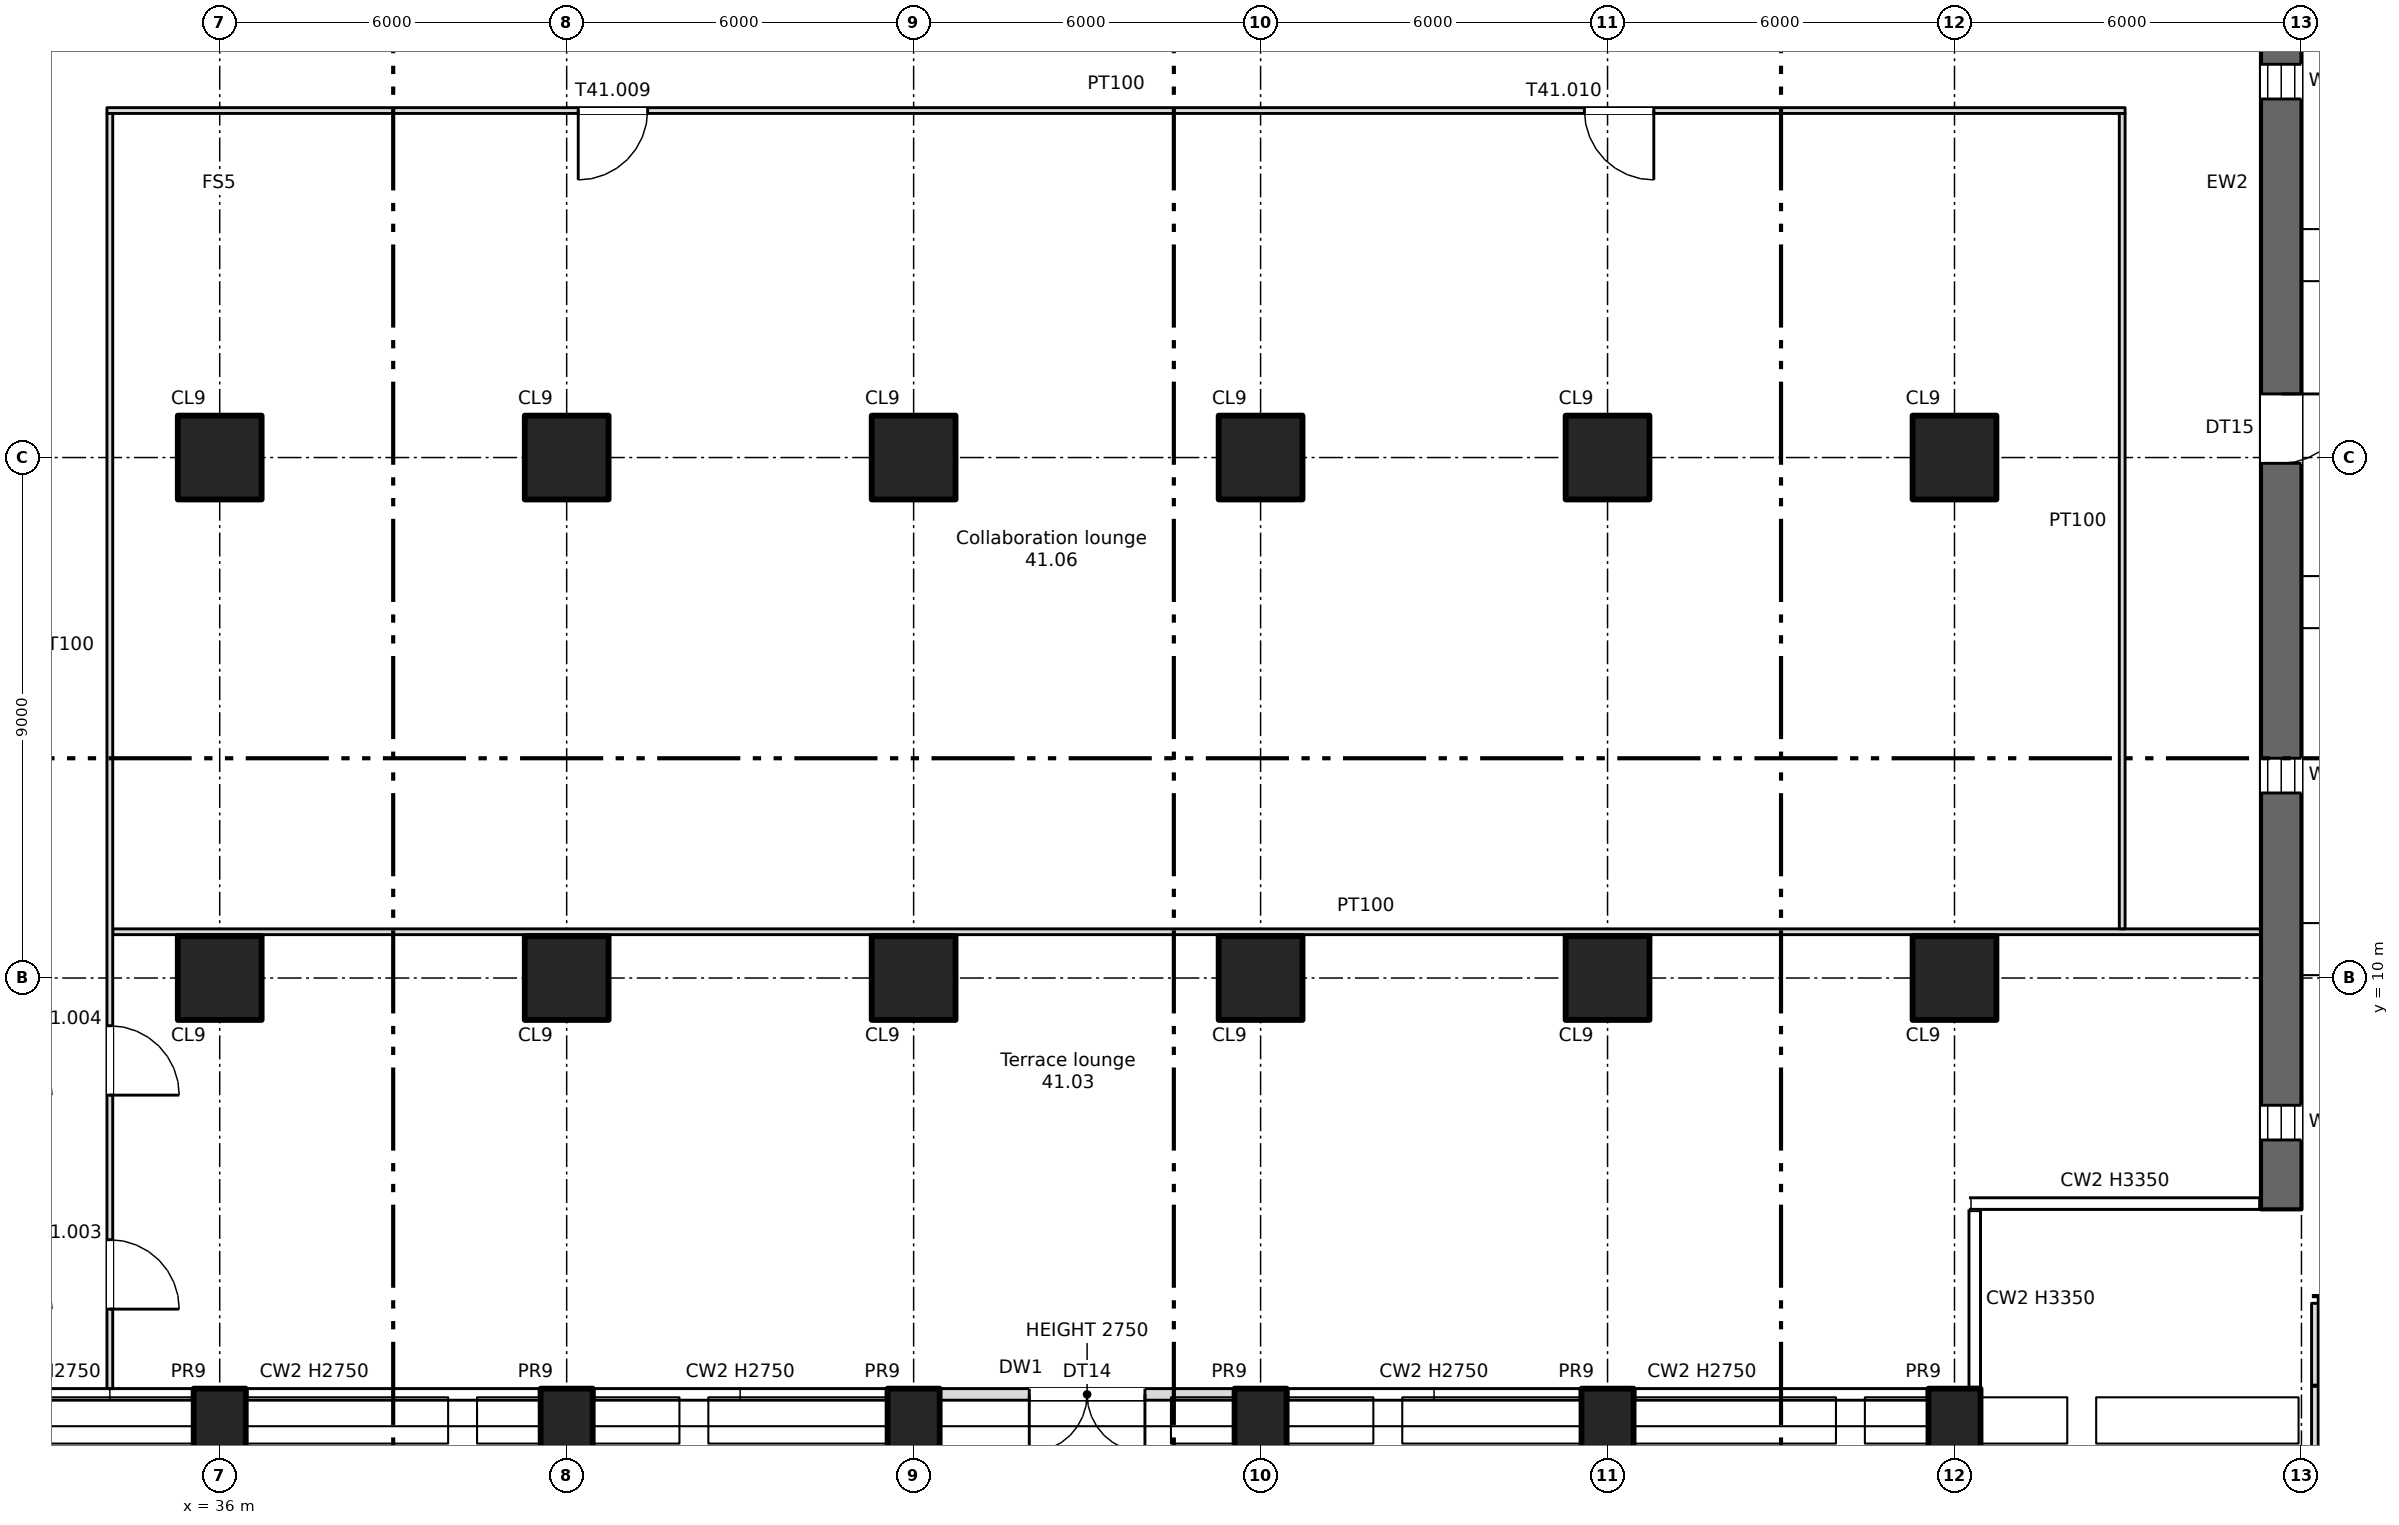
"""IFC4 building model, lengths in metres.
Left out: names, types, materials, properties, quantities, classifications, styles, units other than length and angle.
Written with IfcOpenShell. Run it as: python <this file> out.ifc"""

import sys

from ifc_helpers import new_model, si_unit, direction, frame, frame_2d, origin, origin_2d, place, context, subcontext, project, spatial, rectangle, extrude, element, fill, save


model = new_model("IFC4")
c1 = context("Model", 3, precision=1e-05, world=origin(), true_north=direction((0.0, 1.0)))
c2 = subcontext(c1, "Body", "Model", "MODEL_VIEW")
j1 = project(units=[si_unit("LENGTHUNIT", "METRE"), si_unit("PLANEANGLEUNIT", "RADIAN")], contexts=[c1])
p1 = place(None, origin())
s1 = spatial("IfcSite", under=j1, at=p1, CompositionType="ELEMENT")
p2 = place(p1, origin())
s2 = spatial("IfcBuilding", under=s1, at=p2, CompositionType="ELEMENT")
p3 = place(p2, frame((0.0, 0.0, 95.0)))
s3 = spatial("IfcBuildingStorey", under=s2, at=p3, CompositionType="ELEMENT", Elevation=95.0)
for number, where, z_axis, x_axis in (
    (1, (36.0, 2.2, 0.0), (0.0, 0.0, 1.0), (1.0, 0.0, 0.0)),
    (2, (42.0, 2.2, 0.0), (0.0, 0.0, 1.0), (1.0, 0.0, 0.0)),
    (3, (48.0, 2.2, 0.0), (0.0, 0.0, 1.0), (1.0, 0.0, 0.0)),
    (4, (54.0, 2.2, 0.0), (0.0, 0.0, 1.0), (1.0, 0.0, 0.0)),
    (5, (60.0, 2.2, 0.0), (0.0, 0.0, 1.0), (1.0, 0.0, 0.0)),
    (6, (66.0, 2.2, 0.0), (0.0, 0.0, 1.0), (1.0, 0.0, 0.0)),
):
    element("IfcColumn", number, at=place(p3, frame(where, z_axis=z_axis, x_axis=x_axis)), inside=s3, PredefinedType="COLUMN", context=c2, shape_type="SweptSolid", body=[
        extrude(rectangle(XDim=0.9, YDim=1.4, at=origin_2d()), origin(), (0.0, 0.0, 1.0), 3.35),
    ])
for number, where, z_axis, x_axis in (
    (7, (36.0, 10.0, 0.0), (0.0, 0.0, 1.0), (1.0, 0.0, 0.0)),
    (8, (36.0, 19.0, 0.0), (0.0, 0.0, 1.0), (1.0, 0.0, 0.0)),
    (9, (42.0, 10.0, 0.0), (0.0, 0.0, 1.0), (1.0, 0.0, 0.0)),
    (10, (42.0, 19.0, 0.0), (0.0, 0.0, 1.0), (1.0, 0.0, 0.0)),
    (11, (48.0, 10.0, 0.0), (0.0, 0.0, 1.0), (1.0, 0.0, 0.0)),
    (12, (48.0, 19.0, 0.0), (0.0, 0.0, 1.0), (1.0, 0.0, 0.0)),
    (13, (54.0, 10.0, 0.0), (0.0, 0.0, 1.0), (1.0, 0.0, 0.0)),
    (14, (54.0, 19.0, 0.0), (0.0, 0.0, 1.0), (1.0, 0.0, 0.0)),
    (15, (60.0, 10.0, 0.0), (0.0, 0.0, 1.0), (1.0, 0.0, 0.0)),
    (16, (60.0, 19.0, 0.0), (0.0, 0.0, 1.0), (1.0, 0.0, 0.0)),
    (17, (66.0, 10.0, 0.0), (0.0, 0.0, 1.0), (1.0, 0.0, 0.0)),
    (18, (66.0, 19.0, 0.0), (0.0, 0.0, 1.0), (1.0, 0.0, 0.0)),
):
    element("IfcColumn", number, at=place(p3, frame(where, z_axis=z_axis, x_axis=x_axis)), inside=s3, PredefinedType="COLUMN", context=c2, shape_type="SweptSolid", body=[
        extrude(rectangle(XDim=1.45, YDim=1.45, at=origin_2d()), origin(), (0.0, 0.0, 1.0), 3.35),
    ])
p4 = place(p3, frame((71.65, 6.0, 0.0), z_axis=(0.0, 0.0, 1.0), x_axis=(0.0, 1.0, 0.0)))
e19 = element("IfcWall", 19, at=p4, inside=s3, PredefinedType="SHEAR", context=c2, shape_type="SweptSolid", body=[
    extrude(rectangle(XDim=35.5, YDim=0.7, at=frame_2d((17.75, 0.0))), origin(), (0.0, 0.0, 1.0), 3.35),
])
p5 = place(p4, frame((1.2, 0.0, 0.6)))
e20 = element("IfcOpeningElement", 20, at=p5, cuts=e19, PredefinedType="OPENING", context=c2, shape_type="SweptSolid", body=[
    extrude(rectangle(XDim=0.6, YDim=2.4, at=frame_2d((0.3, 1.2))), frame((0.0, 0.36, 0.0), z_axis=(0.0, -1.0, 0.0), x_axis=(1.0, 0.0, 0.0)), (0.0, 0.0, 1.0), 0.72),
])
p6 = place(p4, frame((7.2, 0.0, 0.6)))
e21 = element("IfcOpeningElement", 21, at=p6, cuts=e19, PredefinedType="OPENING", context=c2, shape_type="SweptSolid", body=[
    extrude(rectangle(XDim=0.6, YDim=2.4, at=frame_2d((0.3, 1.2))), frame((0.0, 0.36, 0.0), z_axis=(0.0, -1.0, 0.0), x_axis=(1.0, 0.0, 0.0)), (0.0, 0.0, 1.0), 0.72),
])
p7 = place(p4, frame((19.2, 0.0, 0.6)))
e22 = element("IfcOpeningElement", 22, at=p7, cuts=e19, PredefinedType="OPENING", context=c2, shape_type="SweptSolid", body=[
    extrude(rectangle(XDim=0.6, YDim=2.4, at=frame_2d((0.3, 1.2))), frame((0.0, 0.36, 0.0), z_axis=(0.0, -1.0, 0.0), x_axis=(1.0, 0.0, 0.0)), (0.0, 0.0, 1.0), 0.72),
])
p8 = place(p4, frame((25.2, 0.0, 0.6)))
e23 = element("IfcOpeningElement", 23, at=p8, cuts=e19, PredefinedType="OPENING", context=c2, shape_type="SweptSolid", body=[
    extrude(rectangle(XDim=0.6, YDim=2.4, at=frame_2d((0.3, 1.2))), frame((0.0, 0.36, 0.0), z_axis=(0.0, -1.0, 0.0), x_axis=(1.0, 0.0, 0.0)), (0.0, 0.0, 1.0), 0.72),
])
p9 = place(p4, frame((31.2, 0.0, 0.6)))
e24 = element("IfcOpeningElement", 24, at=p9, cuts=e19, PredefinedType="OPENING", context=c2, shape_type="SweptSolid", body=[
    extrude(rectangle(XDim=0.6, YDim=2.4, at=frame_2d((0.3, 1.2))), frame((0.0, 0.36, 0.0), z_axis=(0.0, -1.0, 0.0), x_axis=(1.0, 0.0, 0.0)), (0.0, 0.0, 1.0), 0.72),
])
p10 = place(p4, frame((12.9, 0.0, 0.0)))
e25 = element("IfcOpeningElement", 25, at=p10, cuts=e19, PredefinedType="OPENING", context=c2, shape_type="SweptSolid", body=[
    extrude(rectangle(XDim=1.2, YDim=2.4, at=frame_2d((0.6, 1.2))), frame((0.0, 0.36, 0.0), z_axis=(0.0, -1.0, 0.0), x_axis=(1.0, 0.0, 0.0)), (0.0, 0.0, 1.0), 0.72),
])
p11 = place(p3, frame((48.45, 2.8, 0.0), z_axis=(0.0, 0.0, 1.0), x_axis=(1.0, 0.0, 0.0)))
e26 = element("IfcWall", 26, at=p11, inside=s3, PredefinedType="SOLIDWALL", context=c2, shape_type="SweptSolid", body=[
    extrude(rectangle(XDim=5.1, YDim=0.2, at=frame_2d((2.55, 0.0))), origin(), (0.0, 0.0, 1.0), 2.75),
])
p12 = place(p11, frame((1.55, 0.0, 0.0)))
e27 = element("IfcOpeningElement", 27, at=p12, cuts=e26, PredefinedType="OPENING", context=c2, shape_type="SweptSolid", body=[
    extrude(rectangle(XDim=2.0, YDim=2.4, at=frame_2d((1.0, 1.2))), frame((0.0, 0.11, 0.0), z_axis=(0.0, -1.0, 0.0), x_axis=(1.0, 0.0, 0.0)), (0.0, 0.0, 1.0), 0.22),
])
p13 = place(p3, frame((72.3, 4.375, 0.0), z_axis=(0.0, 0.0, 1.0), x_axis=(0.0, -1.0, 0.0)))
e28 = element("IfcWall", 28, at=p13, inside=s3, PredefinedType="PARAPET", context=c2, shape_type="SweptSolid", body=[
    extrude(rectangle(XDim=2.85, YDim=0.25, at=frame_2d((1.425, 0.0))), origin(), (0.0, 0.0, 1.0), 0.3),
])
p14 = place(p3, frame((34.15, 10.8, 0.0), z_axis=(0.0, 0.0, 1.0), x_axis=(1.0, 0.0, 0.0)))
e29 = element("IfcWall", 29, at=p14, inside=s3, PredefinedType="PARTITIONING", context=c2, shape_type="SweptSolid", body=[
    extrude(rectangle(XDim=37.15, YDim=0.1, at=frame_2d((18.575, 0.0))), origin(), (0.0, 0.0, 1.0), 3.35),
])
p15 = place(p3, frame((34.05, 25.0, 0.0), z_axis=(0.0, 0.0, 1.0), x_axis=(1.0, 0.0, 0.0)))
e30 = element("IfcWall", 30, at=p15, inside=s3, PredefinedType="PARTITIONING", context=c2, shape_type="SweptSolid", body=[
    extrude(rectangle(XDim=34.9, YDim=0.1, at=frame_2d((17.45, 0.0))), origin(), (0.0, 0.0, 1.0), 3.35),
])
p16 = place(p15, frame((8.15, 0.0, 0.0)))
e31 = element("IfcOpeningElement", 31, at=p16, cuts=e30, PredefinedType="OPENING", context=c2, shape_type="SweptSolid", body=[
    extrude(rectangle(XDim=1.2, YDim=2.1, at=frame_2d((0.6, 1.05))), frame((0.0, 0.06, 0.0), z_axis=(0.0, -1.0, 0.0), x_axis=(1.0, 0.0, 0.0)), (0.0, 0.0, 1.0), 0.12),
])
p17 = place(p15, frame((25.55, 0.0, 0.0)))
e32 = element("IfcOpeningElement", 32, at=p17, cuts=e30, PredefinedType="OPENING", context=c2, shape_type="SweptSolid", body=[
    extrude(rectangle(XDim=1.2, YDim=2.1, at=frame_2d((0.6, 1.05))), frame((0.0, 0.06, 0.0), z_axis=(0.0, -1.0, 0.0), x_axis=(1.0, 0.0, 0.0)), (0.0, 0.0, 1.0), 0.12),
])
p18 = place(p3, frame((34.1, 2.9, 0.0), z_axis=(0.0, 0.0, 1.0), x_axis=(0.0, 1.0, 0.0)))
e33 = element("IfcWall", 33, at=p18, inside=s3, PredefinedType="PARTITIONING", context=c2, shape_type="SweptSolid", body=[
    extrude(rectangle(XDim=22.05, YDim=0.1, at=frame_2d((11.025, 0.0))), origin(), (0.0, 0.0, 1.0), 3.35),
])
p19 = place(p18, frame((1.375, 0.0, 0.0)))
e34 = element("IfcOpeningElement", 34, at=p19, cuts=e33, PredefinedType="OPENING", context=c2, shape_type="SweptSolid", body=[
    extrude(rectangle(XDim=1.2, YDim=2.1, at=frame_2d((0.6, 1.05))), frame((0.0, 0.06, 0.0), z_axis=(0.0, -1.0, 0.0), x_axis=(1.0, 0.0, 0.0)), (0.0, 0.0, 1.0), 0.12),
])
p20 = place(p18, frame((5.075, 0.0, 0.0)))
e35 = element("IfcOpeningElement", 35, at=p20, cuts=e33, PredefinedType="OPENING", context=c2, shape_type="SweptSolid", body=[
    extrude(rectangle(XDim=1.2, YDim=2.1, at=frame_2d((0.6, 1.05))), frame((0.0, 0.06, 0.0), z_axis=(0.0, -1.0, 0.0), x_axis=(1.0, 0.0, 0.0)), (0.0, 0.0, 1.0), 0.12),
])
p21 = place(p3, frame((68.9, 10.85, 0.0), z_axis=(0.0, 0.0, 1.0), x_axis=(0.0, 1.0, 0.0)))
e36 = element("IfcWall", 36, at=p21, inside=s3, PredefinedType="PARTITIONING", context=c2, shape_type="SweptSolid", body=[
    extrude(rectangle(XDim=14.1, YDim=0.1, at=frame_2d((7.05, 0.0))), origin(), (0.0, 0.0, 1.0), 3.35),
])
p22 = place(p5, origin())
e37 = element("IfcWindow", 37, at=p22, inside=s3, PartitioningType="SINGLE_PANEL", PredefinedType="WINDOW", context=c2, shape_type="SweptSolid", body=[
    extrude(rectangle(XDim=0.6, YDim=2.4, at=frame_2d((0.3, 1.2))), frame((0.0, 0.03, 0.0), z_axis=(0.0, -1.0, 0.0), x_axis=(1.0, 0.0, 0.0)), (0.0, 0.0, 1.0), 0.06),
])
fill(e20, e37)
p23 = place(p6, origin())
e38 = element("IfcWindow", 38, at=p23, inside=s3, PartitioningType="SINGLE_PANEL", PredefinedType="WINDOW", context=c2, shape_type="SweptSolid", body=[
    extrude(rectangle(XDim=0.6, YDim=2.4, at=frame_2d((0.3, 1.2))), frame((0.0, 0.03, 0.0), z_axis=(0.0, -1.0, 0.0), x_axis=(1.0, 0.0, 0.0)), (0.0, 0.0, 1.0), 0.06),
])
fill(e21, e38)
p24 = place(p7, origin())
e39 = element("IfcWindow", 39, at=p24, inside=s3, PartitioningType="SINGLE_PANEL", PredefinedType="WINDOW", context=c2, shape_type="SweptSolid", body=[
    extrude(rectangle(XDim=0.6, YDim=2.4, at=frame_2d((0.3, 1.2))), frame((0.0, 0.03, 0.0), z_axis=(0.0, -1.0, 0.0), x_axis=(1.0, 0.0, 0.0)), (0.0, 0.0, 1.0), 0.06),
])
fill(e22, e39)
p25 = place(p12, frame((2.0, 0.0, 0.0), z_axis=(0.0, 0.0, 1.0), x_axis=(-1.0, 0.0, 0.0)))
e40 = element("IfcDoor", 40, at=p25, inside=s3, OperationType="DOUBLE_DOOR_SINGLE_SWING", PredefinedType="DOOR", context=c2, shape_type="SweptSolid", body=[
    extrude(rectangle(XDim=2.0, YDim=2.4, at=frame_2d((1.0, 1.2))), frame((0.0, 0.025, 0.0), z_axis=(0.0, -1.0, 0.0), x_axis=(1.0, 0.0, 0.0)), (0.0, 0.0, 1.0), 0.05),
])
fill(e27, e40)
p26 = place(p10, frame((1.2, 0.0, 0.0), z_axis=(0.0, 0.0, 1.0), x_axis=(-1.0, 0.0, 0.0)))
e41 = element("IfcDoor", 41, at=p26, inside=s3, OperationType="SINGLE_SWING_LEFT", PredefinedType="DOOR", context=c2, shape_type="SweptSolid", body=[
    extrude(rectangle(XDim=1.2, YDim=2.4, at=frame_2d((0.6, 1.2))), frame((0.0, 0.025, 0.0), z_axis=(0.0, -1.0, 0.0), x_axis=(1.0, 0.0, 0.0)), (0.0, 0.0, 1.0), 0.05),
])
fill(e25, e41)
p27 = place(p19, origin())
e42 = element("IfcDoor", 42, at=p27, inside=s3, OperationType="SINGLE_SWING_LEFT", PredefinedType="DOOR", context=c2, shape_type="SweptSolid", body=[
    extrude(rectangle(XDim=1.2, YDim=2.1, at=frame_2d((0.6, 1.05))), frame((0.0, 0.025, 0.0), z_axis=(0.0, -1.0, 0.0), x_axis=(1.0, 0.0, 0.0)), (0.0, 0.0, 1.0), 0.05),
])
fill(e34, e42)
p28 = place(p20, origin())
e43 = element("IfcDoor", 43, at=p28, inside=s3, OperationType="SINGLE_SWING_LEFT", PredefinedType="DOOR", context=c2, shape_type="SweptSolid", body=[
    extrude(rectangle(XDim=1.2, YDim=2.1, at=frame_2d((0.6, 1.05))), frame((0.0, 0.025, 0.0), z_axis=(0.0, -1.0, 0.0), x_axis=(1.0, 0.0, 0.0)), (0.0, 0.0, 1.0), 0.05),
])
fill(e35, e43)
p29 = place(p16, origin())
e44 = element("IfcDoor", 44, at=p29, inside=s3, OperationType="SINGLE_SWING_LEFT", PredefinedType="DOOR", context=c2, shape_type="SweptSolid", body=[
    extrude(rectangle(XDim=1.2, YDim=2.1, at=frame_2d((0.6, 1.05))), frame((0.0, 0.025, 0.0), z_axis=(0.0, -1.0, 0.0), x_axis=(1.0, 0.0, 0.0)), (0.0, 0.0, 1.0), 0.05),
])
fill(e31, e44)
p30 = place(p17, origin())
e45 = element("IfcDoor", 45, at=p30, inside=s3, OperationType="SINGLE_SWING_RIGHT", PredefinedType="DOOR", context=c2, shape_type="SweptSolid", body=[
    extrude(rectangle(XDim=1.2, YDim=2.1, at=frame_2d((0.6, 1.05))), frame((0.0, 0.025, 0.0), z_axis=(0.0, -1.0, 0.0), x_axis=(1.0, 0.0, 0.0)), (0.0, 0.0, 1.0), 0.05),
])
fill(e32, e45)
save(model, sys.argv[1])
